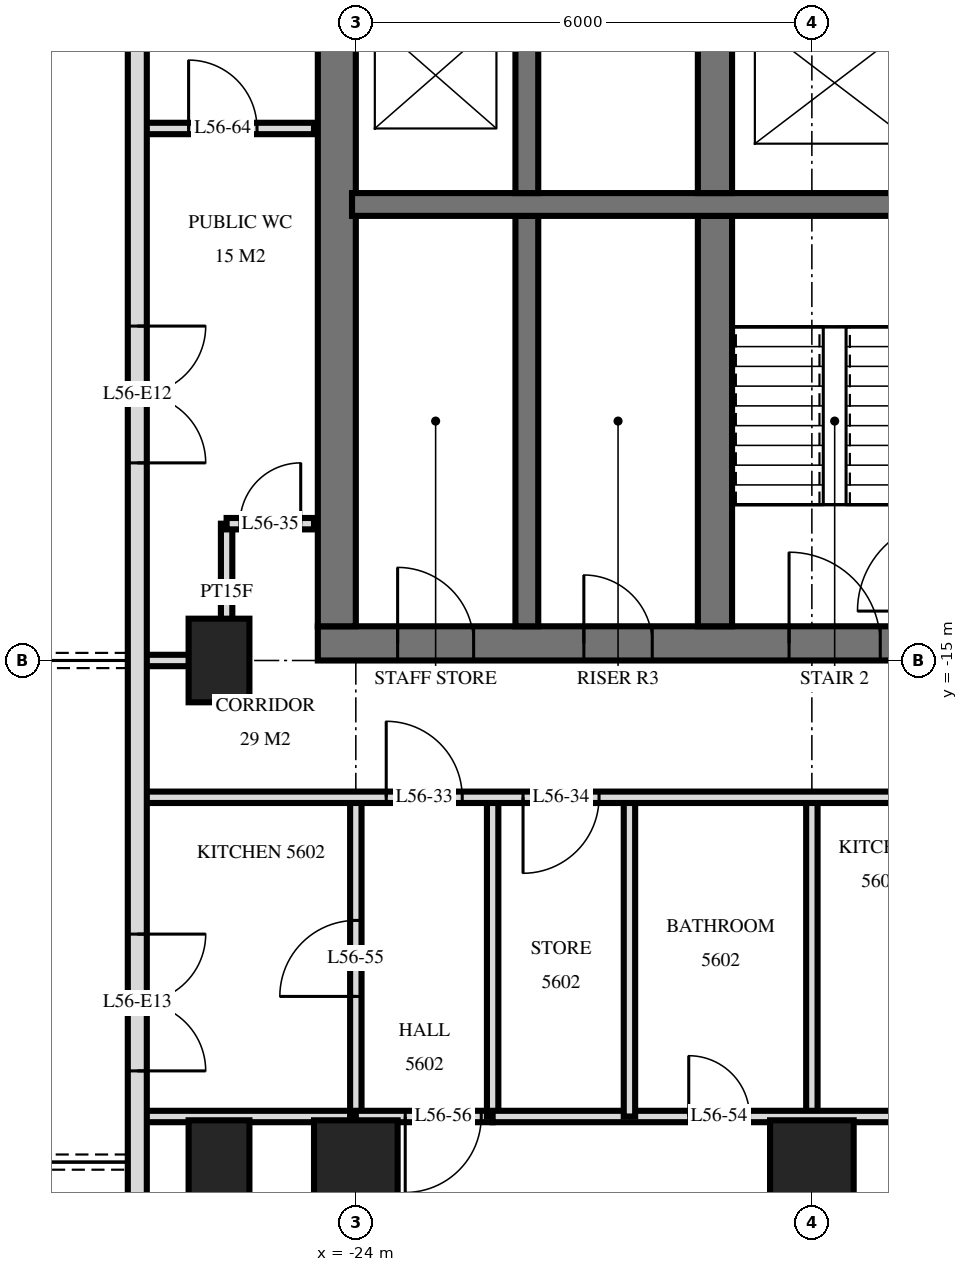
"""IFC4 building model, lengths in metres.
Left out: names, types, materials, properties, quantities, classifications, styles, units other than length and angle.
Written with IfcOpenShell. Run it as: python <this file> out.ifc"""

import sys

from ifc_helpers import new_model, si_unit, direction, frame, frame_2d, origin, origin_2d, place, context, subcontext, project, spatial, rectangle, extrude, element, fill, save


model = new_model("IFC4")
c1 = context("Model", 3, precision=1e-05, world=origin(), true_north=direction((0.0, 1.0)))
c2 = subcontext(c1, "Body", "Model", "MODEL_VIEW")
j1 = project(units=[si_unit("LENGTHUNIT", "METRE"), si_unit("PLANEANGLEUNIT", "RADIAN")], contexts=[c1])
p1 = place(None, origin())
s1 = spatial("IfcSite", under=j1, at=p1, CompositionType="ELEMENT")
p2 = place(p1, origin())
s2 = spatial("IfcBuilding", under=s1, at=p2, CompositionType="ELEMENT")
p3 = place(p2, frame((0.0, 0.0, 215.1)))
s3 = spatial("IfcBuildingStorey", under=s2, at=p3, CompositionType="ELEMENT", Elevation=215.1)
for number, where, z_axis, x_axis in (
    (1, (-25.8, -21.6, 0.0), (0.0, 0.0, 1.0), (0.0, 1.0, 0.0)),
    (2, (-25.8, -15.0, 0.0), (0.0, 0.0, 1.0), (0.0, 1.0, 0.0)),
):
    element("IfcColumn", number, at=place(p3, frame(where, z_axis=z_axis, x_axis=x_axis)), inside=s3, PredefinedType="COLUMN", context=c2, shape_type="SweptSolid", body=[
        extrude(rectangle(XDim=1.1, YDim=0.8, at=origin_2d()), origin(), (0.0, 0.0, 1.0), 3.5),
    ])
for number, where, z_axis, x_axis in (
    (3, (-24.0, -21.6, 0.0), (0.0, 0.0, 1.0), (1.0, 0.0, 0.0)),
    (4, (-18.0, -21.6, 0.0), (0.0, 0.0, 1.0), (1.0, 0.0, 0.0)),
):
    element("IfcColumn", number, at=place(p3, frame(where, z_axis=z_axis, x_axis=x_axis)), inside=s3, PredefinedType="COLUMN", context=c2, shape_type="SweptSolid", body=[
        extrude(rectangle(XDim=1.1, YDim=1.1, at=origin_2d()), origin(), (0.0, 0.0, 1.0), 3.5),
    ])
p4 = place(p3, frame((-24.5, -14.775, 0.0), z_axis=(0.0, 0.0, 1.0), x_axis=(1.0, 0.0, 0.0)))
e5 = element("IfcWall", 5, at=p4, inside=s3, PredefinedType="SHEAR", context=c2, shape_type="SweptSolid", body=[
    extrude(rectangle(XDim=14.5, YDim=0.45, at=frame_2d((7.25, 0.0))), origin(), (0.0, 0.0, 1.0), 3.5),
])
p5 = place(p4, frame((6.2, 0.0, 0.0)))
e6 = element("IfcOpeningElement", 6, at=p5, cuts=e5, PredefinedType="OPENING", context=c2, shape_type="SweptSolid", body=[
    extrude(rectangle(XDim=1.2, YDim=2.1, at=frame_2d((0.6, 1.05))), frame((0.0, 0.235, 0.0), z_axis=(0.0, -1.0, 0.0), x_axis=(1.0, 0.0, 0.0)), (0.0, 0.0, 1.0), 0.47),
])
p6 = place(p4, frame((9.25, 0.0, 0.0)))
e7 = element("IfcOpeningElement", 7, at=p6, cuts=e5, PredefinedType="OPENING", context=c2, shape_type="SweptSolid", body=[
    extrude(rectangle(XDim=1.1, YDim=2.1, at=frame_2d((0.55, 1.05))), frame((0.0, 0.235, 0.0), z_axis=(0.0, -1.0, 0.0), x_axis=(1.0, 0.0, 0.0)), (0.0, 0.0, 1.0), 0.47),
])
p7 = place(p4, frame((3.5, 0.0, 0.0)))
e8 = element("IfcOpeningElement", 8, at=p7, cuts=e5, PredefinedType="OPENING", context=c2, shape_type="SweptSolid", body=[
    extrude(rectangle(XDim=0.9, YDim=2.1, at=frame_2d((0.45, 1.05))), frame((0.0, 0.235, 0.0), z_axis=(0.0, -1.0, 0.0), x_axis=(1.0, 0.0, 0.0)), (0.0, 0.0, 1.0), 0.47),
])
p8 = place(p4, frame((1.05, 0.0, 0.0)))
e9 = element("IfcOpeningElement", 9, at=p8, cuts=e5, PredefinedType="OPENING", context=c2, shape_type="SweptSolid", body=[
    extrude(rectangle(XDim=1.0, YDim=2.1, at=frame_2d((0.5, 1.05))), frame((0.0, 0.235, 0.0), z_axis=(0.0, -1.0, 0.0), x_axis=(1.0, 0.0, 0.0)), (0.0, 0.0, 1.0), 0.47),
])
p9 = place(p3, frame((-24.25, -14.55, 0.0), z_axis=(0.0, 0.0, 1.0), x_axis=(0.0, 1.0, 0.0)))
e10 = element("IfcWall", 10, at=p9, inside=s3, PredefinedType="SHEAR", context=c2, shape_type="SweptSolid", body=[
    extrude(rectangle(XDim=14.1, YDim=0.5, at=frame_2d((7.05, 0.0))), origin(), (0.0, 0.0, 1.0), 3.5),
])
p10 = place(p3, frame((-24.05, -9.0, 0.0), z_axis=(0.0, 0.0, 1.0), x_axis=(1.0, 0.0, 0.0)))
e11 = element("IfcWall", 11, at=p10, inside=s3, PredefinedType="SHEAR", context=c2, shape_type="SweptSolid", body=[
    extrude(rectangle(XDim=13.7, YDim=0.3, at=frame_2d((6.85, 0.0))), origin(), (0.0, 0.0, 1.0), 3.5),
])
p11 = place(p10, frame((8.8, 0.0, 0.0)))
e12 = element("IfcOpeningElement", 12, at=p11, cuts=e11, PredefinedType="OPENING", context=c2, shape_type="SweptSolid", body=[
    extrude(rectangle(XDim=1.1, YDim=2.1, at=frame_2d((0.55, 1.05))), frame((0.0, 0.16, 0.0), z_axis=(0.0, -1.0, 0.0), x_axis=(1.0, 0.0, 0.0)), (0.0, 0.0, 1.0), 0.32),
])
p12 = place(p3, frame((-19.275, -8.85, 0.0), z_axis=(0.0, 0.0, 1.0), x_axis=(0.0, 1.0, 0.0)))
e13 = element("IfcWall", 13, at=p12, inside=s3, PredefinedType="SHEAR", context=c2, shape_type="SweptSolid", body=[
    extrude(rectangle(XDim=2.3, YDim=0.45, at=frame_2d((1.15, 0.0))), origin(), (0.0, 0.0, 1.0), 3.5),
])
p13 = place(p3, frame((-19.275, -14.55, 0.0), z_axis=(0.0, 0.0, 1.0), x_axis=(0.0, 1.0, 0.0)))
e14 = element("IfcWall", 14, at=p13, inside=s3, PredefinedType="SHEAR", context=c2, shape_type="SweptSolid", body=[
    extrude(rectangle(XDim=5.4, YDim=0.45, at=frame_2d((2.7, 0.0))), origin(), (0.0, 0.0, 1.0), 3.5),
])
p14 = place(p3, frame((-21.75, -8.85, 0.0), z_axis=(0.0, 0.0, 1.0), x_axis=(0.0, 1.0, 0.0)))
e15 = element("IfcWall", 15, at=p14, inside=s3, PredefinedType="SHEAR", context=c2, shape_type="SweptSolid", body=[
    extrude(rectangle(XDim=2.3, YDim=0.3, at=frame_2d((1.15, 0.0))), origin(), (0.0, 0.0, 1.0), 3.5),
])
p15 = place(p3, frame((-21.75, -14.55, 0.0), z_axis=(0.0, 0.0, 1.0), x_axis=(0.0, 1.0, 0.0)))
e16 = element("IfcWall", 16, at=p15, inside=s3, PredefinedType="SHEAR", context=c2, shape_type="SweptSolid", body=[
    extrude(rectangle(XDim=5.4, YDim=0.3, at=frame_2d((2.7, 0.0))), origin(), (0.0, 0.0, 1.0), 3.5),
])
p16 = place(p3, frame((-26.875, -3.325, 0.0), z_axis=(0.0, 0.0, 1.0), x_axis=(0.0, -1.0, 0.0)))
e17 = element("IfcWall", 17, at=p16, inside=s3, PredefinedType="SOLIDWALL", context=c2, shape_type="SweptSolid", body=[
    extrude(rectangle(XDim=21.551, YDim=0.25, at=frame_2d((10.775, 0.0))), origin(), (0.0, 0.0, 1.0), 3.22),
])
p17 = place(p16, frame((7.275, 0.0, 0.0)))
e18 = element("IfcOpeningElement", 18, at=p17, cuts=e17, PredefinedType="OPENING", context=c2, shape_type="SweptSolid", body=[
    extrude(rectangle(XDim=1.8, YDim=2.4, at=frame_2d((0.9, 1.2))), frame((0.0, 0.135, 0.0), z_axis=(0.0, -1.0, 0.0), x_axis=(1.0, 0.0, 0.0)), (0.0, 0.0, 1.0), 0.27),
])
p18 = place(p16, frame((15.275, 0.0, 0.0)))
e19 = element("IfcOpeningElement", 19, at=p18, cuts=e17, PredefinedType="OPENING", context=c2, shape_type="SweptSolid", body=[
    extrude(rectangle(XDim=1.8, YDim=2.4, at=frame_2d((0.9, 1.2))), frame((0.0, 0.135, 0.0), z_axis=(0.0, -1.0, 0.0), x_axis=(1.0, 0.0, 0.0)), (0.0, 0.0, 1.0), 0.27),
])
p19 = place(p16, frame((18.875, 0.0, 0.0)))
e20 = element("IfcOpeningElement", 20, at=p19, cuts=e17, PredefinedType="OPENING", context=c2, shape_type="SweptSolid", body=[
    extrude(rectangle(XDim=1.8, YDim=2.4, at=frame_2d((0.9, 1.2))), frame((0.0, 0.135, 0.0), z_axis=(0.0, -1.0, 0.0), x_axis=(1.0, 0.0, 0.0)), (0.0, 0.0, 1.0), 0.27),
])
p20 = place(p3, frame((-18.0, -29.22, 0.0), z_axis=(0.0, 0.0, 1.0), x_axis=(0.0, 1.0, 0.0)))
e21 = element("IfcWall", 21, at=p20, inside=s3, PredefinedType="PARTITIONING", context=c2, shape_type="SweptSolid", body=[
    extrude(rectangle(XDim=12.42, YDim=0.15, at=frame_2d((6.21, 0.0))), origin(), (0.0, 0.0, 1.0), 3.22),
])
for number, where, z_axis, x_axis in (
    (22, (-20.4, -21.0, 0.0), (0.0, 0.0, 1.0), (0.0, 1.0, 0.0)),
    (23, (-22.2, -21.0, 0.0), (0.0, 0.0, 1.0), (0.0, 1.0, 0.0)),
):
    element("IfcWall", number, at=place(p3, frame(where, z_axis=z_axis, x_axis=x_axis)), inside=s3, PredefinedType="PARTITIONING", context=c2, shape_type="SweptSolid", body=[
        extrude(rectangle(XDim=4.2, YDim=0.15, at=frame_2d((2.1, 0.0))), origin(), (0.0, 0.0, 1.0), 3.22),
    ])
p21 = place(p3, frame((-24.0, -21.0, 0.0), z_axis=(0.0, 0.0, 1.0), x_axis=(0.0, 1.0, 0.0)))
e24 = element("IfcWall", 24, at=p21, inside=s3, PredefinedType="PARTITIONING", context=c2, shape_type="SweptSolid", body=[
    extrude(rectangle(XDim=4.2, YDim=0.15, at=frame_2d((2.1, 0.0))), origin(), (0.0, 0.0, 1.0), 3.22),
])
p22 = place(p21, frame((1.58, 0.0, 0.0)))
e25 = element("IfcOpeningElement", 25, at=p22, cuts=e24, PredefinedType="OPENING", context=c2, shape_type="SweptSolid", body=[
    extrude(rectangle(XDim=1.0, YDim=2.1, at=frame_2d((0.5, 1.05))), frame((0.0, 0.085, 0.0), z_axis=(0.0, -1.0, 0.0), x_axis=(1.0, 0.0, 0.0)), (0.0, 0.0, 1.0), 0.17),
])
p23 = place(p3, frame((-24.0, -28.918, 0.0), z_axis=(0.0, 0.0, 1.0), x_axis=(0.0, 1.0, 0.0)))
e26 = element("IfcWall", 26, at=p23, inside=s3, PredefinedType="PARTITIONING", context=c2, shape_type="SweptSolid", body=[
    extrude(rectangle(XDim=7.918, YDim=0.15, at=frame_2d((3.959, 0.0))), origin(), (0.0, 0.0, 1.0), 3.22),
])
p24 = place(p23, frame((3.436, 0.0, 0.0)))
e27 = element("IfcOpeningElement", 27, at=p24, cuts=e26, PredefinedType="OPENING", context=c2, shape_type="SweptSolid", body=[
    extrude(rectangle(XDim=0.9, YDim=2.1, at=frame_2d((0.45, 1.05))), frame((0.0, 0.085, 0.0), z_axis=(0.0, -1.0, 0.0), x_axis=(1.0, 0.0, 0.0)), (0.0, 0.0, 1.0), 0.17),
])
p25 = place(p3, frame((-25.7, -15.0, 0.0), z_axis=(0.0, 0.0, 1.0), x_axis=(0.0, 1.0, 0.0)))
e28 = element("IfcWall", 28, at=p25, inside=s3, PredefinedType="PARTITIONING", context=c2, shape_type="SweptSolid", body=[
    extrude(rectangle(XDim=1.8, YDim=0.15, at=frame_2d((0.9, 0.0))), origin(), (0.0, 0.0, 1.0), 3.22),
])
p26 = place(p3, frame((-24.0, -21.0, 0.0), z_axis=(0.0, 0.0, 1.0), x_axis=(1.0, 0.0, 0.0)))
e29 = element("IfcWall", 29, at=p26, inside=s3, PredefinedType="PARTITIONING", context=c2, shape_type="SweptSolid", body=[
    extrude(rectangle(XDim=1.8, YDim=0.15, at=frame_2d((0.9, 0.0))), origin(), (0.0, 0.0, 1.0), 3.22),
])
p27 = place(p26, frame((0.65, 0.0, 0.0)))
e30 = element("IfcOpeningElement", 30, at=p27, cuts=e29, PredefinedType="OPENING", context=c2, shape_type="SweptSolid", body=[
    extrude(rectangle(XDim=1.0, YDim=2.1, at=frame_2d((0.5, 1.05))), frame((0.0, 0.085, 0.0), z_axis=(0.0, -1.0, 0.0), x_axis=(1.0, 0.0, 0.0)), (0.0, 0.0, 1.0), 0.17),
])
p28 = place(p3, frame((-26.82, -21.0, 0.0), z_axis=(0.0, 0.0, 1.0), x_axis=(1.0, 0.0, 0.0)))
e31 = element("IfcWall", 31, at=p28, inside=s3, PredefinedType="PARTITIONING", context=c2, shape_type="SweptSolid", body=[
    extrude(rectangle(XDim=2.82, YDim=0.15, at=frame_2d((1.41, 0.0))), origin(), (0.0, 0.0, 1.0), 3.22),
])
p29 = place(p3, frame((-22.2, -21.0, 0.0), z_axis=(0.0, 0.0, 1.0), x_axis=(1.0, 0.0, 0.0)))
e32 = element("IfcWall", 32, at=p29, inside=s3, PredefinedType="PARTITIONING", context=c2, shape_type="SweptSolid", body=[
    extrude(rectangle(XDim=6.3, YDim=0.15, at=frame_2d((3.15, 0.0))), origin(), (0.0, 0.0, 1.0), 3.22),
])
p30 = place(p29, frame((2.58, 0.0, 0.0)))
e33 = element("IfcOpeningElement", 33, at=p30, cuts=e32, PredefinedType="OPENING", context=c2, shape_type="SweptSolid", body=[
    extrude(rectangle(XDim=0.8, YDim=2.1, at=frame_2d((0.4, 1.05))), frame((0.0, 0.085, 0.0), z_axis=(0.0, -1.0, 0.0), x_axis=(1.0, 0.0, 0.0)), (0.0, 0.0, 1.0), 0.17),
])
p31 = place(p3, frame((-26.82, -16.8, 0.0), z_axis=(0.0, 0.0, 1.0), x_axis=(1.0, 0.0, 0.0)))
e34 = element("IfcWall", 34, at=p31, inside=s3, PredefinedType="PARTITIONING", context=c2, shape_type="SweptSolid", body=[
    extrude(rectangle(XDim=53.64, YDim=0.15, at=frame_2d((26.82, 0.0))), origin(), (0.0, 0.0, 1.0), 3.22),
])
p32 = place(p31, frame((11.17, 0.0, 0.0)))
e35 = element("IfcOpeningElement", 35, at=p32, cuts=e34, PredefinedType="OPENING", context=c2, shape_type="SweptSolid", body=[
    extrude(rectangle(XDim=1.0, YDim=2.1, at=frame_2d((0.5, 1.05))), frame((0.0, 0.085, 0.0), z_axis=(0.0, -1.0, 0.0), x_axis=(1.0, 0.0, 0.0)), (0.0, 0.0, 1.0), 0.17),
])
p33 = place(p31, frame((3.22, 0.0, 0.0)))
e36 = element("IfcOpeningElement", 36, at=p33, cuts=e34, PredefinedType="OPENING", context=c2, shape_type="SweptSolid", body=[
    extrude(rectangle(XDim=1.0, YDim=2.1, at=frame_2d((0.5, 1.05))), frame((0.0, 0.085, 0.0), z_axis=(0.0, -1.0, 0.0), x_axis=(1.0, 0.0, 0.0)), (0.0, 0.0, 1.0), 0.17),
])
p34 = place(p31, frame((5.02, 0.0, 0.0)))
e37 = element("IfcOpeningElement", 37, at=p34, cuts=e34, PredefinedType="OPENING", context=c2, shape_type="SweptSolid", body=[
    extrude(rectangle(XDim=1.0, YDim=2.1, at=frame_2d((0.5, 1.05))), frame((0.0, 0.085, 0.0), z_axis=(0.0, -1.0, 0.0), x_axis=(1.0, 0.0, 0.0)), (0.0, 0.0, 1.0), 0.17),
])
p35 = place(p31, frame((47.72, 0.0, 0.0)))
e38 = element("IfcOpeningElement", 38, at=p35, cuts=e34, PredefinedType="OPENING", context=c2, shape_type="SweptSolid", body=[
    extrude(rectangle(XDim=1.0, YDim=2.1, at=frame_2d((0.5, 1.05))), frame((0.0, 0.085, 0.0), z_axis=(0.0, -1.0, 0.0), x_axis=(1.0, 0.0, 0.0)), (0.0, 0.0, 1.0), 0.17),
])
p36 = place(p31, frame((51.04, 0.0, 0.0)))
e39 = element("IfcOpeningElement", 39, at=p36, cuts=e34, PredefinedType="OPENING", context=c2, shape_type="SweptSolid", body=[
    extrude(rectangle(XDim=1.0, YDim=2.1, at=frame_2d((0.5, 1.05))), frame((0.0, 0.085, 0.0), z_axis=(0.0, -1.0, 0.0), x_axis=(1.0, 0.0, 0.0)), (0.0, 0.0, 1.0), 0.17),
])
p37 = place(p31, frame((17.32, 0.0, 0.0)))
e40 = element("IfcOpeningElement", 40, at=p37, cuts=e34, PredefinedType="OPENING", context=c2, shape_type="SweptSolid", body=[
    extrude(rectangle(XDim=1.0, YDim=2.1, at=frame_2d((0.5, 1.05))), frame((0.0, 0.085, 0.0), z_axis=(0.0, -1.0, 0.0), x_axis=(1.0, 0.0, 0.0)), (0.0, 0.0, 1.0), 0.17),
])
p38 = place(p31, frame((26.32, 0.0, 0.0)))
e41 = element("IfcOpeningElement", 41, at=p38, cuts=e34, PredefinedType="OPENING", context=c2, shape_type="SweptSolid", body=[
    extrude(rectangle(XDim=1.0, YDim=2.1, at=frame_2d((0.5, 1.05))), frame((0.0, 0.085, 0.0), z_axis=(0.0, -1.0, 0.0), x_axis=(1.0, 0.0, 0.0)), (0.0, 0.0, 1.0), 0.17),
])
p39 = place(p31, frame((35.32, 0.0, 0.0)))
e42 = element("IfcOpeningElement", 42, at=p39, cuts=e34, PredefinedType="OPENING", context=c2, shape_type="SweptSolid", body=[
    extrude(rectangle(XDim=1.0, YDim=2.1, at=frame_2d((0.5, 1.05))), frame((0.0, 0.085, 0.0), z_axis=(0.0, -1.0, 0.0), x_axis=(1.0, 0.0, 0.0)), (0.0, 0.0, 1.0), 0.17),
])
p40 = place(p3, frame((-26.82, -15.0, 0.0), z_axis=(0.0, 0.0, 1.0), x_axis=(1.0, 0.0, 0.0)))
e43 = element("IfcWall", 43, at=p40, inside=s3, PredefinedType="PARTITIONING", context=c2, shape_type="SweptSolid", body=[
    extrude(rectangle(XDim=1.12, YDim=0.15, at=frame_2d((0.56, 0.0))), origin(), (0.0, 0.0, 1.0), 3.22),
])
p41 = place(p3, frame((-25.7, -13.2, 0.0), z_axis=(0.0, 0.0, 1.0), x_axis=(1.0, 0.0, 0.0)))
e44 = element("IfcWall", 44, at=p41, inside=s3, PredefinedType="PARTITIONING", context=c2, shape_type="SweptSolid", body=[
    extrude(rectangle(XDim=1.15, YDim=0.15, at=frame_2d((0.575, 0.0))), origin(), (0.0, 0.0, 1.0), 3.22),
])
p42 = place(p41, frame((0.175, 0.0, 0.0)))
e45 = element("IfcOpeningElement", 45, at=p42, cuts=e44, PredefinedType="OPENING", context=c2, shape_type="SweptSolid", body=[
    extrude(rectangle(XDim=0.8, YDim=2.1, at=frame_2d((0.4, 1.05))), frame((0.0, 0.085, 0.0), z_axis=(0.0, -1.0, 0.0), x_axis=(1.0, 0.0, 0.0)), (0.0, 0.0, 1.0), 0.17),
])
p43 = place(p3, frame((-26.82, -8.0, 0.0), z_axis=(0.0, 0.0, 1.0), x_axis=(1.0, 0.0, 0.0)))
e46 = element("IfcWall", 46, at=p43, inside=s3, PredefinedType="PLUMBINGWALL", context=c2, shape_type="SweptSolid", body=[
    extrude(rectangle(XDim=2.27, YDim=0.15, at=frame_2d((1.135, 0.0))), origin(), (0.0, 0.0, 1.0), 3.22),
])
p44 = place(p43, frame((0.62, 0.0, 0.0)))
e47 = element("IfcOpeningElement", 47, at=p44, cuts=e46, PredefinedType="OPENING", context=c2, shape_type="SweptSolid", body=[
    extrude(rectangle(XDim=0.9, YDim=2.1, at=frame_2d((0.45, 1.05))), frame((0.0, 0.085, 0.0), z_axis=(0.0, -1.0, 0.0), x_axis=(1.0, 0.0, 0.0)), (0.0, 0.0, 1.0), 0.17),
])
p45 = place(p17, origin())
e48 = element("IfcDoor", 48, at=p45, inside=s3, OperationType="DOUBLE_DOOR_SINGLE_SWING", PredefinedType="DOOR", context=c2, shape_type="SweptSolid", body=[
    extrude(rectangle(XDim=1.8, YDim=2.4, at=frame_2d((0.9, 1.2))), frame((0.0, 0.025, 0.0), z_axis=(0.0, -1.0, 0.0), x_axis=(1.0, 0.0, 0.0)), (0.0, 0.0, 1.0), 0.05),
])
fill(e18, e48)
p46 = place(p18, origin())
e49 = element("IfcDoor", 49, at=p46, inside=s3, OperationType="DOUBLE_DOOR_SINGLE_SWING", PredefinedType="DOOR", context=c2, shape_type="SweptSolid", body=[
    extrude(rectangle(XDim=1.8, YDim=2.4, at=frame_2d((0.9, 1.2))), frame((0.0, 0.025, 0.0), z_axis=(0.0, -1.0, 0.0), x_axis=(1.0, 0.0, 0.0)), (0.0, 0.0, 1.0), 0.05),
])
fill(e19, e49)
p47 = place(p5, origin())
e50 = element("IfcDoor", 50, at=p47, inside=s3, OperationType="SINGLE_SWING_RIGHT", PredefinedType="DOOR", context=c2, shape_type="SweptSolid", body=[
    extrude(rectangle(XDim=1.2, YDim=2.1, at=frame_2d((0.6, 1.05))), frame((0.0, 0.025, 0.0), z_axis=(0.0, -1.0, 0.0), x_axis=(1.0, 0.0, 0.0)), (0.0, 0.0, 1.0), 0.05),
])
fill(e6, e50)
p48 = place(p7, origin())
e51 = element("IfcDoor", 51, at=p48, inside=s3, OperationType="SINGLE_SWING_RIGHT", PredefinedType="DOOR", context=c2, shape_type="SweptSolid", body=[
    extrude(rectangle(XDim=0.9, YDim=2.1, at=frame_2d((0.45, 1.05))), frame((0.0, 0.025, 0.0), z_axis=(0.0, -1.0, 0.0), x_axis=(1.0, 0.0, 0.0)), (0.0, 0.0, 1.0), 0.05),
])
fill(e8, e51)
p49 = place(p8, origin())
e52 = element("IfcDoor", 52, at=p49, inside=s3, OperationType="SINGLE_SWING_RIGHT", PredefinedType="DOOR", context=c2, shape_type="SweptSolid", body=[
    extrude(rectangle(XDim=1.0, YDim=2.1, at=frame_2d((0.5, 1.05))), frame((0.0, 0.025, 0.0), z_axis=(0.0, -1.0, 0.0), x_axis=(1.0, 0.0, 0.0)), (0.0, 0.0, 1.0), 0.05),
])
fill(e9, e52)
p50 = place(p33, origin())
e53 = element("IfcDoor", 53, at=p50, inside=s3, OperationType="SINGLE_SWING_RIGHT", PredefinedType="DOOR", context=c2, shape_type="SweptSolid", body=[
    extrude(rectangle(XDim=1.0, YDim=2.1, at=frame_2d((0.5, 1.05))), frame((0.0, 0.025, 0.0), z_axis=(0.0, -1.0, 0.0), x_axis=(1.0, 0.0, 0.0)), (0.0, 0.0, 1.0), 0.05),
])
fill(e36, e53)
p51 = place(p34, frame((0.5, 0.0, 0.0), z_axis=(0.0, 0.0, 1.0), x_axis=(-1.0, 0.0, 0.0)))
e54 = element("IfcDoor", 54, at=p51, inside=s3, OperationType="SINGLE_SWING_LEFT", PredefinedType="DOOR", context=c2, shape_type="SweptSolid", body=[
    extrude(rectangle(XDim=1.0, YDim=2.1, at=frame_2d((0.0, 1.05))), frame((0.0, -0.025, 0.0), z_axis=(0.0, 1.0, 0.0), x_axis=(-1.0, 0.0, 0.0)), (0.0, 0.0, 1.0), 0.05),
])
fill(e37, e54)
p52 = place(p42, origin())
e55 = element("IfcDoor", 55, at=p52, inside=s3, OperationType="SINGLE_SWING_LEFT", PredefinedType="DOOR", context=c2, shape_type="SweptSolid", body=[
    extrude(rectangle(XDim=0.8, YDim=2.1, at=frame_2d((0.4, 1.05))), frame((0.0, 0.025, 0.0), z_axis=(0.0, -1.0, 0.0), x_axis=(1.0, 0.0, 0.0)), (0.0, 0.0, 1.0), 0.05),
])
fill(e45, e55)
p53 = place(p30, origin())
e56 = element("IfcDoor", 56, at=p53, inside=s3, OperationType="SINGLE_SWING_RIGHT", PredefinedType="DOOR", context=c2, shape_type="SweptSolid", body=[
    extrude(rectangle(XDim=0.8, YDim=2.1, at=frame_2d((0.4, 1.05))), frame((0.0, 0.025, 0.0), z_axis=(0.0, -1.0, 0.0), x_axis=(1.0, 0.0, 0.0)), (0.0, 0.0, 1.0), 0.05),
])
fill(e33, e56)
p54 = place(p22, origin())
e57 = element("IfcDoor", 57, at=p54, inside=s3, OperationType="SINGLE_SWING_RIGHT", PredefinedType="DOOR", context=c2, shape_type="SweptSolid", body=[
    extrude(rectangle(XDim=1.0, YDim=2.1, at=frame_2d((0.5, 1.05))), frame((0.0, 0.025, 0.0), z_axis=(0.0, -1.0, 0.0), x_axis=(1.0, 0.0, 0.0)), (0.0, 0.0, 1.0), 0.05),
])
fill(e25, e57)
p55 = place(p27, frame((0.5, 0.0, 0.0), z_axis=(0.0, 0.0, 1.0), x_axis=(-1.0, 0.0, 0.0)))
e58 = element("IfcDoor", 58, at=p55, inside=s3, OperationType="SINGLE_SWING_LEFT", PredefinedType="DOOR", context=c2, shape_type="SweptSolid", body=[
    extrude(rectangle(XDim=1.0, YDim=2.1, at=frame_2d((0.0, 1.05))), frame((0.0, -0.025, 0.0), z_axis=(0.0, 1.0, 0.0), x_axis=(-1.0, 0.0, 0.0)), (0.0, 0.0, 1.0), 0.05),
])
fill(e30, e58)
p56 = place(p44, origin())
e59 = element("IfcDoor", 59, at=p56, inside=s3, OperationType="SINGLE_SWING_RIGHT", PredefinedType="DOOR", context=c2, shape_type="SweptSolid", body=[
    extrude(rectangle(XDim=0.9, YDim=2.1, at=frame_2d((0.45, 1.05))), frame((0.0, 0.025, 0.0), z_axis=(0.0, -1.0, 0.0), x_axis=(1.0, 0.0, 0.0)), (0.0, 0.0, 1.0), 0.05),
])
fill(e47, e59)
save(model, sys.argv[1])
